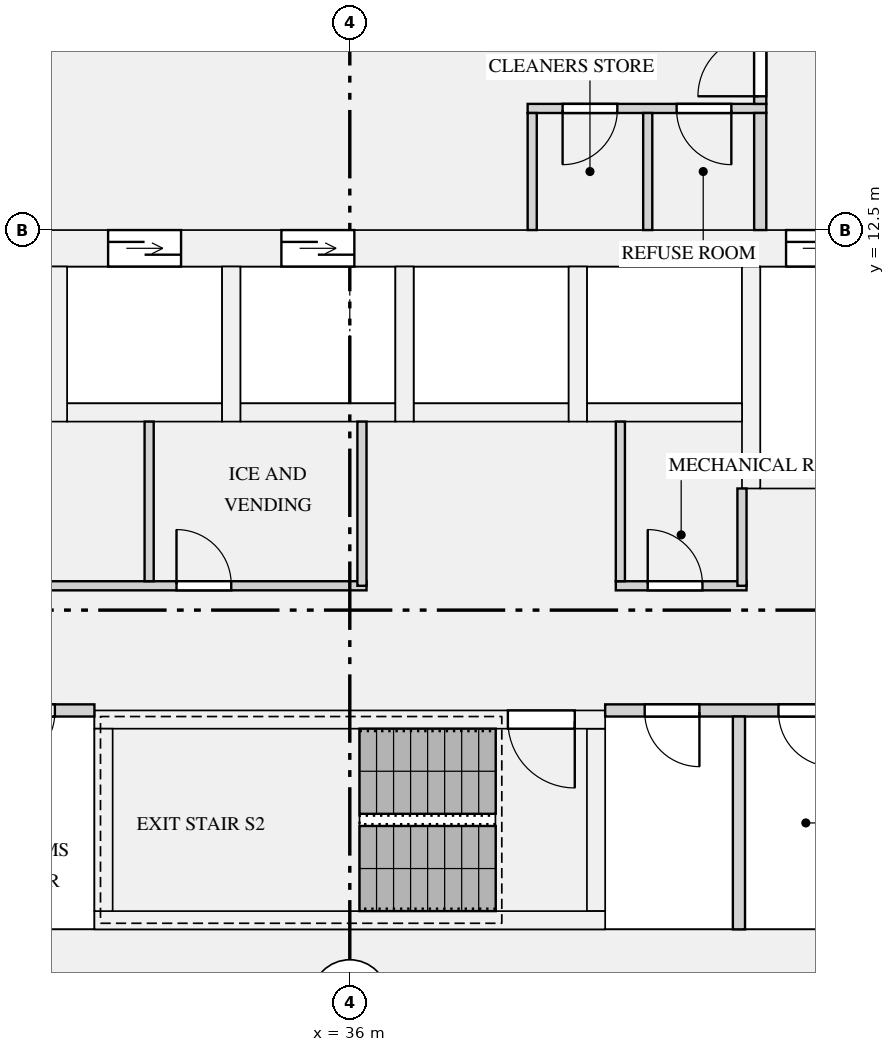
"""IFC4 building model, lengths in metres.
Left out: names, types, materials, properties, quantities, classifications, styles, units other than length and angle.
Written with IfcOpenShell. Run it as: python <this file> out.ifc"""

import sys

from ifc_helpers import new_model, si_unit, direction, frame, frame_2d, origin, place, context, subcontext, project, spatial, rectangle, extrude, element, fill, save


model = new_model("IFC4")
c1 = context("Model", 3, precision=1e-05, world=origin(), true_north=direction((0.0, 1.0)))
c2 = subcontext(c1, "Body", "Model", "MODEL_VIEW")
j1 = project(units=[si_unit("LENGTHUNIT", "METRE"), si_unit("PLANEANGLEUNIT", "RADIAN")], contexts=[c1])
p1 = place(None, origin())
s1 = spatial("IfcSite", under=j1, at=p1, CompositionType="ELEMENT")
p2 = place(p1, origin())
s2 = spatial("IfcBuilding", under=s1, at=p2, CompositionType="ELEMENT")
p3 = place(p2, frame((0.0, 0.0, 54.15)))
s3 = spatial("IfcBuildingStorey", under=s2, at=p3, CompositionType="ELEMENT", Elevation=54.15)
p4 = place(p3, frame((19.0, 0.5, 0.0), z_axis=(0.0, 0.0, 1.0), x_axis=(1.0, 0.0, 0.0)))
e1 = element("IfcWall", 1, at=p4, inside=s3, PredefinedType="SHEAR", context=c2, shape_type="SweptSolid", body=[
    extrude(rectangle(XDim=34.0, YDim=1.0, at=frame_2d((17.0, 0.0))), origin(), (0.0, 0.0, 1.0), 3.15),
])
p5 = place(p3, frame((19.0, 12.2, 0.0), z_axis=(0.0, 0.0, 1.0), x_axis=(1.0, 0.0, 0.0)))
e2 = element("IfcWall", 2, at=p5, inside=s3, PredefinedType="SHEAR", context=c2, shape_type="SweptSolid", body=[
    extrude(rectangle(XDim=34.0, YDim=0.6, at=frame_2d((17.0, 0.0))), origin(), (0.0, 0.0, 1.0), 3.15),
])
p6 = place(p5, frame((4.475, 0.0, 0.0)))
e3 = element("IfcOpeningElement", 3, at=p6, cuts=e2, PredefinedType="OPENING", context=c2, shape_type="SweptSolid", body=[
    extrude(rectangle(XDim=1.2, YDim=2.1, at=frame_2d((0.6, 1.05))), frame((0.0, 0.31, 0.0), z_axis=(0.0, -1.0, 0.0), x_axis=(1.0, 0.0, 0.0)), (0.0, 0.0, 1.0), 0.62),
])
p7 = place(p5, frame((7.325, 0.0, 0.0)))
e4 = element("IfcOpeningElement", 4, at=p7, cuts=e2, PredefinedType="OPENING", context=c2, shape_type="SweptSolid", body=[
    extrude(rectangle(XDim=1.2, YDim=2.1, at=frame_2d((0.6, 1.05))), frame((0.0, 0.31, 0.0), z_axis=(0.0, -1.0, 0.0), x_axis=(1.0, 0.0, 0.0)), (0.0, 0.0, 1.0), 0.62),
])
p8 = place(p5, frame((10.175, 0.0, 0.0)))
e5 = element("IfcOpeningElement", 5, at=p8, cuts=e2, PredefinedType="OPENING", context=c2, shape_type="SweptSolid", body=[
    extrude(rectangle(XDim=1.2, YDim=2.1, at=frame_2d((0.6, 1.05))), frame((0.0, 0.31, 0.0), z_axis=(0.0, -1.0, 0.0), x_axis=(1.0, 0.0, 0.0)), (0.0, 0.0, 1.0), 0.62),
])
p9 = place(p5, frame((13.025, 0.0, 0.0)))
e6 = element("IfcOpeningElement", 6, at=p9, cuts=e2, PredefinedType="OPENING", context=c2, shape_type="SweptSolid", body=[
    extrude(rectangle(XDim=1.2, YDim=2.1, at=frame_2d((0.6, 1.05))), frame((0.0, 0.31, 0.0), z_axis=(0.0, -1.0, 0.0), x_axis=(1.0, 0.0, 0.0)), (0.0, 0.0, 1.0), 0.62),
])
p10 = place(p5, frame((15.875, 0.0, 0.0)))
e7 = element("IfcOpeningElement", 7, at=p10, cuts=e2, PredefinedType="OPENING", context=c2, shape_type="SweptSolid", body=[
    extrude(rectangle(XDim=1.2, YDim=2.1, at=frame_2d((0.6, 1.05))), frame((0.0, 0.31, 0.0), z_axis=(0.0, -1.0, 0.0), x_axis=(1.0, 0.0, 0.0)), (0.0, 0.0, 1.0), 0.62),
])
p11 = place(p5, frame((24.175, 0.0, 0.0)))
e8 = element("IfcOpeningElement", 8, at=p11, cuts=e2, PredefinedType="OPENING", context=c2, shape_type="SweptSolid", body=[
    extrude(rectangle(XDim=1.1, YDim=2.1, at=frame_2d((0.55, 1.05))), frame((0.0, 0.31, 0.0), z_axis=(0.0, -1.0, 0.0), x_axis=(1.0, 0.0, 0.0)), (0.0, 0.0, 1.0), 0.62),
])
p12 = place(p5, frame((26.425, 0.0, 0.0)))
e9 = element("IfcOpeningElement", 9, at=p12, cuts=e2, PredefinedType="OPENING", context=c2, shape_type="SweptSolid", body=[
    extrude(rectangle(XDim=1.1, YDim=2.1, at=frame_2d((0.55, 1.05))), frame((0.0, 0.31, 0.0), z_axis=(0.0, -1.0, 0.0), x_axis=(1.0, 0.0, 0.0)), (0.0, 0.0, 1.0), 0.62),
])
p13 = place(p5, frame((28.675, 0.0, 0.0)))
e10 = element("IfcOpeningElement", 10, at=p13, cuts=e2, PredefinedType="OPENING", context=c2, shape_type="SweptSolid", body=[
    extrude(rectangle(XDim=1.1, YDim=2.1, at=frame_2d((0.55, 1.05))), frame((0.0, 0.31, 0.0), z_axis=(0.0, -1.0, 0.0), x_axis=(1.0, 0.0, 0.0)), (0.0, 0.0, 1.0), 0.62),
])
p14 = place(p5, frame((1.15, 0.0, 0.0)))
e11 = element("IfcOpeningElement", 11, at=p14, cuts=e2, PredefinedType="OPENING", context=c2, shape_type="SweptSolid", body=[
    extrude(rectangle(XDim=1.2, YDim=2.1, at=frame_2d((0.6, 1.05))), frame((0.0, 0.31, 0.0), z_axis=(0.0, -1.0, 0.0), x_axis=(1.0, 0.0, 0.0)), (0.0, 0.0, 1.0), 0.62),
])
p15 = place(p5, frame((31.65, 0.0, 0.0)))
e12 = element("IfcOpeningElement", 12, at=p15, cuts=e2, PredefinedType="OPENING", context=c2, shape_type="SweptSolid", body=[
    extrude(rectangle(XDim=1.2, YDim=2.1, at=frame_2d((0.6, 1.05))), frame((0.0, 0.31, 0.0), z_axis=(0.0, -1.0, 0.0), x_axis=(1.0, 0.0, 0.0)), (0.0, 0.0, 1.0), 0.62),
])
for number, where, z_axis, x_axis in (
    (13, (31.35, 9.5, 0.0), (0.0, 0.0, 1.0), (1.0, 0.0, 0.0)),
    (14, (31.2, 9.35, 0.0), (0.0, 0.0, 1.0), (0.0, 1.0, 0.0)),
):
    element("IfcWall", number, at=place(p3, frame(where, z_axis=z_axis, x_axis=x_axis)), inside=s3, PredefinedType="SHEAR", context=c2, shape_type="SweptSolid", body=[
        extrude(rectangle(XDim=2.55, YDim=0.3, at=frame_2d((1.275, 0.0))), origin(), (0.0, 0.0, 1.0), 3.15),
    ])
p16 = place(p3, frame((34.2, 9.5, 0.0), z_axis=(0.0, 0.0, 1.0), x_axis=(1.0, 0.0, 0.0)))
e15 = element("IfcWall", 15, at=p16, inside=s3, PredefinedType="SHEAR", context=c2, shape_type="SweptSolid", body=[
    extrude(rectangle(XDim=2.55, YDim=0.3, at=frame_2d((1.275, 0.0))), origin(), (0.0, 0.0, 1.0), 3.15),
])
p17 = place(p3, frame((34.05, 9.35, 0.0), z_axis=(0.0, 0.0, 1.0), x_axis=(0.0, 1.0, 0.0)))
e16 = element("IfcWall", 16, at=p17, inside=s3, PredefinedType="SHEAR", context=c2, shape_type="SweptSolid", body=[
    extrude(rectangle(XDim=2.55, YDim=0.3, at=frame_2d((1.275, 0.0))), origin(), (0.0, 0.0, 1.0), 3.15),
])
p18 = place(p3, frame((37.05, 9.5, 0.0), z_axis=(0.0, 0.0, 1.0), x_axis=(1.0, 0.0, 0.0)))
e17 = element("IfcWall", 17, at=p18, inside=s3, PredefinedType="SHEAR", context=c2, shape_type="SweptSolid", body=[
    extrude(rectangle(XDim=2.55, YDim=0.3, at=frame_2d((1.275, 0.0))), origin(), (0.0, 0.0, 1.0), 3.15),
])
p19 = place(p3, frame((36.9, 9.35, 0.0), z_axis=(0.0, 0.0, 1.0), x_axis=(0.0, 1.0, 0.0)))
e18 = element("IfcWall", 18, at=p19, inside=s3, PredefinedType="SHEAR", context=c2, shape_type="SweptSolid", body=[
    extrude(rectangle(XDim=2.55, YDim=0.3, at=frame_2d((1.275, 0.0))), origin(), (0.0, 0.0, 1.0), 3.15),
])
p20 = place(p3, frame((39.9, 9.5, 0.0), z_axis=(0.0, 0.0, 1.0), x_axis=(1.0, 0.0, 0.0)))
e19 = element("IfcWall", 19, at=p20, inside=s3, PredefinedType="SHEAR", context=c2, shape_type="SweptSolid", body=[
    extrude(rectangle(XDim=2.55, YDim=0.3, at=frame_2d((1.275, 0.0))), origin(), (0.0, 0.0, 1.0), 3.15),
])
p21 = place(p3, frame((39.75, 9.35, 0.0), z_axis=(0.0, 0.0, 1.0), x_axis=(0.0, 1.0, 0.0)))
e20 = element("IfcWall", 20, at=p21, inside=s3, PredefinedType="SHEAR", context=c2, shape_type="SweptSolid", body=[
    extrude(rectangle(XDim=2.55, YDim=0.3, at=frame_2d((1.275, 0.0))), origin(), (0.0, 0.0, 1.0), 3.15),
])
p22 = place(p3, frame((42.75, 8.4, 0.0), z_axis=(0.0, 0.0, 1.0), x_axis=(1.0, 0.0, 0.0)))
e21 = element("IfcWall", 21, at=p22, inside=s3, PredefinedType="SHEAR", context=c2, shape_type="SweptSolid", body=[
    extrude(rectangle(XDim=1.95, YDim=0.3, at=frame_2d((0.975, 0.0))), origin(), (0.0, 0.0, 1.0), 3.15),
])
p23 = place(p3, frame((42.6, 8.25, 0.0), z_axis=(0.0, 0.0, 1.0), x_axis=(0.0, 1.0, 0.0)))
e22 = element("IfcWall", 22, at=p23, inside=s3, PredefinedType="SHEAR", context=c2, shape_type="SweptSolid", body=[
    extrude(rectangle(XDim=3.65, YDim=0.3, at=frame_2d((1.825, 0.0))), origin(), (0.0, 0.0, 1.0), 3.15),
])
p24 = place(p3, frame((31.8, 1.15, 0.0), z_axis=(0.0, 0.0, 1.0), x_axis=(1.0, 0.0, 0.0)))
e23 = element("IfcWall", 23, at=p24, inside=s3, PredefinedType="SHEAR", context=c2, shape_type="SweptSolid", body=[
    extrude(rectangle(XDim=8.4, YDim=0.3, at=frame_2d((4.2, 0.0))), origin(), (0.0, 0.0, 1.0), 3.15),
])
p25 = place(p3, frame((31.8, 4.45, 0.0), z_axis=(0.0, 0.0, 1.0), x_axis=(1.0, 0.0, 0.0)))
e24 = element("IfcWall", 24, at=p25, inside=s3, PredefinedType="SHEAR", context=c2, shape_type="SweptSolid", body=[
    extrude(rectangle(XDim=8.4, YDim=0.3, at=frame_2d((4.2, 0.0))), origin(), (0.0, 0.0, 1.0), 3.15),
])
p26 = place(p25, frame((6.8, 0.0, 0.0)))
e25 = element("IfcOpeningElement", 25, at=p26, cuts=e24, PredefinedType="OPENING", context=c2, shape_type="SweptSolid", body=[
    extrude(rectangle(XDim=1.1, YDim=2.1, at=frame_2d((0.55, 1.05))), frame((0.0, 0.16, 0.0), z_axis=(0.0, -1.0, 0.0), x_axis=(1.0, 0.0, 0.0)), (0.0, 0.0, 1.0), 0.32),
])
for number, where, z_axis, x_axis in (
    (26, (31.95, 1.3, 0.0), (0.0, 0.0, 1.0), (0.0, 1.0, 0.0)),
    (27, (40.05, 1.3, 0.0), (0.0, 0.0, 1.0), (0.0, 1.0, 0.0)),
):
    element("IfcWall", number, at=place(p3, frame(where, z_axis=z_axis, x_axis=x_axis)), inside=s3, PredefinedType="SHEAR", context=c2, shape_type="SweptSolid", body=[
        extrude(rectangle(XDim=3.0, YDim=0.3, at=frame_2d((1.5, 0.0))), origin(), (0.0, 0.0, 1.0), 3.15),
    ])
p27 = place(p3, frame((27.3, 4.6, 0.0), z_axis=(0.0, 0.0, 1.0), x_axis=(1.0, 0.0, 0.0)))
e28 = element("IfcWall", 28, at=p27, inside=s3, PredefinedType="PARTITIONING", context=c2, shape_type="SweptSolid", body=[
    extrude(rectangle(XDim=4.5, YDim=0.2, at=frame_2d((2.25, 0.0))), origin(), (0.0, 0.0, 1.0), 2.83),
])
p28 = place(p27, frame((0.75, 0.0, 0.0)))
e29 = element("IfcOpeningElement", 29, at=p28, cuts=e28, PredefinedType="OPENING", context=c2, shape_type="SweptSolid", body=[
    extrude(rectangle(XDim=0.9, YDim=2.1, at=frame_2d((0.45, 1.05))), frame((0.0, 0.11, 0.0), z_axis=(0.0, -1.0, 0.0), x_axis=(1.0, 0.0, 0.0)), (0.0, 0.0, 1.0), 0.22),
])
p29 = place(p27, frame((2.95, 0.0, 0.0)))
e30 = element("IfcOpeningElement", 30, at=p29, cuts=e28, PredefinedType="OPENING", context=c2, shape_type="SweptSolid", body=[
    extrude(rectangle(XDim=0.9, YDim=2.1, at=frame_2d((0.45, 1.05))), frame((0.0, 0.11, 0.0), z_axis=(0.0, -1.0, 0.0), x_axis=(1.0, 0.0, 0.0)), (0.0, 0.0, 1.0), 0.22),
])
p30 = place(p3, frame((40.2, 4.6, 0.0), z_axis=(0.0, 0.0, 1.0), x_axis=(1.0, 0.0, 0.0)))
e31 = element("IfcWall", 31, at=p30, inside=s3, PredefinedType="PARTITIONING", context=c2, shape_type="SweptSolid", body=[
    extrude(rectangle(XDim=4.5, YDim=0.2, at=frame_2d((2.25, 0.0))), origin(), (0.0, 0.0, 1.0), 2.83),
])
p31 = place(p30, frame((0.65, 0.0, 0.0)))
e32 = element("IfcOpeningElement", 32, at=p31, cuts=e31, PredefinedType="OPENING", context=c2, shape_type="SweptSolid", body=[
    extrude(rectangle(XDim=0.9, YDim=2.1, at=frame_2d((0.45, 1.05))), frame((0.0, 0.11, 0.0), z_axis=(0.0, -1.0, 0.0), x_axis=(1.0, 0.0, 0.0)), (0.0, 0.0, 1.0), 0.22),
])
p32 = place(p30, frame((2.85, 0.0, 0.0)))
e33 = element("IfcOpeningElement", 33, at=p32, cuts=e31, PredefinedType="OPENING", context=c2, shape_type="SweptSolid", body=[
    extrude(rectangle(XDim=0.9, YDim=2.1, at=frame_2d((0.45, 1.05))), frame((0.0, 0.11, 0.0), z_axis=(0.0, -1.0, 0.0), x_axis=(1.0, 0.0, 0.0)), (0.0, 0.0, 1.0), 0.22),
])
p33 = place(p3, frame((27.625, 6.65, 0.0), z_axis=(0.0, 0.0, 1.0), x_axis=(1.0, 0.0, 0.0)))
e34 = element("IfcWall", 34, at=p33, inside=s3, PredefinedType="PARTITIONING", context=c2, shape_type="SweptSolid", body=[
    extrude(rectangle(XDim=8.65, YDim=0.15, at=frame_2d((4.325, 0.0))), origin(), (0.0, 0.0, 1.0), 2.83),
])
p34 = place(p33, frame((0.525, 0.0, 0.0)))
e35 = element("IfcOpeningElement", 35, at=p34, cuts=e34, PredefinedType="OPENING", context=c2, shape_type="SweptSolid", body=[
    extrude(rectangle(XDim=0.9, YDim=2.1, at=frame_2d((0.45, 1.05))), frame((0.0, 0.085, 0.0), z_axis=(0.0, -1.0, 0.0), x_axis=(1.0, 0.0, 0.0)), (0.0, 0.0, 1.0), 0.17),
])
p35 = place(p33, frame((5.525, 0.0, 0.0)))
e36 = element("IfcOpeningElement", 36, at=p35, cuts=e34, PredefinedType="OPENING", context=c2, shape_type="SweptSolid", body=[
    extrude(rectangle(XDim=0.9, YDim=2.1, at=frame_2d((0.45, 1.05))), frame((0.0, 0.085, 0.0), z_axis=(0.0, -1.0, 0.0), x_axis=(1.0, 0.0, 0.0)), (0.0, 0.0, 1.0), 0.17),
])
p36 = place(p3, frame((40.375, 6.65, 0.0), z_axis=(0.0, 0.0, 1.0), x_axis=(1.0, 0.0, 0.0)))
e37 = element("IfcWall", 37, at=p36, inside=s3, PredefinedType="PARTITIONING", context=c2, shape_type="SweptSolid", body=[
    extrude(rectangle(XDim=2.15, YDim=0.15, at=frame_2d((1.075, 0.0))), origin(), (0.0, 0.0, 1.0), 2.83),
])
p37 = place(p36, frame((0.525, 0.0, 0.0)))
e38 = element("IfcOpeningElement", 38, at=p37, cuts=e37, PredefinedType="OPENING", context=c2, shape_type="SweptSolid", body=[
    extrude(rectangle(XDim=0.9, YDim=2.1, at=frame_2d((0.45, 1.05))), frame((0.0, 0.085, 0.0), z_axis=(0.0, -1.0, 0.0), x_axis=(1.0, 0.0, 0.0)), (0.0, 0.0, 1.0), 0.17),
])
p38 = place(p3, frame((38.925, 14.5, 0.0), z_axis=(0.0, 0.0, 1.0), x_axis=(1.0, 0.0, 0.0)))
e39 = element("IfcWall", 39, at=p38, inside=s3, PredefinedType="PARTITIONING", context=c2, shape_type="SweptSolid", body=[
    extrude(rectangle(XDim=3.925, YDim=0.15, at=frame_2d((1.962, 0.0))), origin(), (0.0, 0.0, 1.0), 2.83),
])
p39 = place(p38, frame((0.575, 0.0, 0.0)))
e40 = element("IfcOpeningElement", 40, at=p39, cuts=e39, PredefinedType="OPENING", context=c2, shape_type="SweptSolid", body=[
    extrude(rectangle(XDim=0.9, YDim=2.1, at=frame_2d((0.45, 1.05))), frame((0.0, 0.085, 0.0), z_axis=(0.0, -1.0, 0.0), x_axis=(1.0, 0.0, 0.0)), (0.0, 0.0, 1.0), 0.17),
])
p40 = place(p38, frame((2.45, 0.0, 0.0)))
e41 = element("IfcOpeningElement", 41, at=p40, cuts=e39, PredefinedType="OPENING", context=c2, shape_type="SweptSolid", body=[
    extrude(rectangle(XDim=0.9, YDim=2.1, at=frame_2d((0.45, 1.05))), frame((0.0, 0.085, 0.0), z_axis=(0.0, -1.0, 0.0), x_axis=(1.0, 0.0, 0.0)), (0.0, 0.0, 1.0), 0.17),
])
p41 = place(p3, frame((42.4, 1.0, 0.0), z_axis=(0.0, 0.0, 1.0), x_axis=(0.0, 1.0, 0.0)))
e42 = element("IfcWall", 42, at=p41, inside=s3, PredefinedType="PARTITIONING", context=c2, shape_type="SweptSolid", body=[
    extrude(rectangle(XDim=3.5, YDim=0.2, at=frame_2d((1.75, 0.0))), origin(), (0.0, 0.0, 1.0), 2.83),
])
p42 = place(p3, frame((36.2, 6.65, 0.0), z_axis=(0.0, 0.0, 1.0), x_axis=(0.0, 1.0, 0.0)))
e43 = element("IfcWall", 43, at=p42, inside=s3, PredefinedType="PARTITIONING", context=c2, shape_type="SweptSolid", body=[
    extrude(rectangle(XDim=2.7, YDim=0.15, at=frame_2d((1.35, 0.0))), origin(), (0.0, 0.0, 1.0), 2.83),
])
p43 = place(p3, frame((42.45, 6.65, 0.0), z_axis=(0.0, 0.0, 1.0), x_axis=(0.0, 1.0, 0.0)))
e44 = element("IfcWall", 44, at=p43, inside=s3, PredefinedType="PARTITIONING", context=c2, shape_type="SweptSolid", body=[
    extrude(rectangle(XDim=1.6, YDim=0.15, at=frame_2d((0.8, 0.0))), origin(), (0.0, 0.0, 1.0), 2.83),
])
for number, where, z_axis, x_axis in (
    (45, (32.7, 6.725, 0.0), (0.0, 0.0, 1.0), (0.0, 1.0, 0.0)),
    (46, (40.45, 6.725, 0.0), (0.0, 0.0, 1.0), (0.0, 1.0, 0.0)),
):
    element("IfcWall", number, at=place(p3, frame(where, z_axis=z_axis, x_axis=x_axis)), inside=s3, PredefinedType="PARTITIONING", context=c2, shape_type="SweptSolid", body=[
        extrude(rectangle(XDim=2.625, YDim=0.15, at=frame_2d((1.312, 0.0))), origin(), (0.0, 0.0, 1.0), 2.83),
    ])
for number, where, z_axis, x_axis in (
    (47, (39.0, 12.5, 0.0), (0.0, 0.0, 1.0), (0.0, 1.0, 0.0)),
    (48, (40.9, 12.5, 0.0), (0.0, 0.0, 1.0), (0.0, 1.0, 0.0)),
):
    element("IfcWall", number, at=place(p3, frame(where, z_axis=z_axis, x_axis=x_axis)), inside=s3, PredefinedType="PARTITIONING", context=c2, shape_type="SweptSolid", body=[
        extrude(rectangle(XDim=1.925, YDim=0.15, at=frame_2d((0.962, 0.0))), origin(), (0.0, 0.0, 1.0), 2.83),
    ])
p44 = place(p3, frame((42.75, 12.5, 0.0), z_axis=(0.0, 0.0, 1.0), x_axis=(0.0, 1.0, 0.0)))
e49 = element("IfcWall", 49, at=p44, inside=s3, PredefinedType="PARTITIONING", context=c2, shape_type="SweptSolid", body=[
    extrude(rectangle(XDim=1.925, YDim=0.2, at=frame_2d((0.962, 0.0))), origin(), (0.0, 0.0, 1.0), 2.83),
])
p45 = place(p3, frame((42.75, 14.575, 0.0), z_axis=(0.0, 0.0, 1.0), x_axis=(0.0, 1.0, 0.0)))
e50 = element("IfcWall", 50, at=p45, inside=s3, PredefinedType="PARTITIONING", context=c2, shape_type="SweptSolid", body=[
    extrude(rectangle(XDim=1.325, YDim=0.2, at=frame_2d((0.663, 0.0))), origin(), (0.0, 0.0, 1.0), 2.83),
])
p46 = place(p45, frame((0.125, 0.0, 0.0)))
e51 = element("IfcOpeningElement", 51, at=p46, cuts=e50, PredefinedType="OPENING", context=c2, shape_type="SweptSolid", body=[
    extrude(rectangle(XDim=1.0, YDim=2.1, at=frame_2d((0.5, 1.05))), frame((0.0, 0.11, 0.0), z_axis=(0.0, -1.0, 0.0), x_axis=(1.0, 0.0, 0.0)), (0.0, 0.0, 1.0), 0.22),
])
p47 = place(p9, origin())
e52 = element("IfcDoor", 52, at=p47, inside=s3, OperationType="DOUBLE_DOOR_SLIDING", PredefinedType="DOOR", context=c2, shape_type="SweptSolid", body=[
    extrude(rectangle(XDim=1.2, YDim=2.1, at=frame_2d((0.6, 1.05))), frame((0.0, 0.025, 0.0), z_axis=(0.0, -1.0, 0.0), x_axis=(1.0, 0.0, 0.0)), (0.0, 0.0, 1.0), 0.05),
])
fill(e6, e52)
p48 = place(p10, origin())
e53 = element("IfcDoor", 53, at=p48, inside=s3, OperationType="DOUBLE_DOOR_SLIDING", PredefinedType="DOOR", context=c2, shape_type="SweptSolid", body=[
    extrude(rectangle(XDim=1.2, YDim=2.1, at=frame_2d((0.6, 1.05))), frame((0.0, 0.025, 0.0), z_axis=(0.0, -1.0, 0.0), x_axis=(1.0, 0.0, 0.0)), (0.0, 0.0, 1.0), 0.05),
])
fill(e7, e53)
p49 = place(p11, origin())
e54 = element("IfcDoor", 54, at=p49, inside=s3, OperationType="DOUBLE_DOOR_SLIDING", PredefinedType="DOOR", context=c2, shape_type="SweptSolid", body=[
    extrude(rectangle(XDim=1.1, YDim=2.1, at=frame_2d((0.55, 1.05))), frame((0.0, 0.025, 0.0), z_axis=(0.0, -1.0, 0.0), x_axis=(1.0, 0.0, 0.0)), (0.0, 0.0, 1.0), 0.05),
])
fill(e8, e54)
p50 = place(p26, frame((1.1, 0.0, 0.0), z_axis=(0.0, 0.0, 1.0), x_axis=(-1.0, 0.0, 0.0)))
e55 = element("IfcDoor", 55, at=p50, inside=s3, OperationType="SINGLE_SWING_LEFT", PredefinedType="DOOR", context=c2, shape_type="SweptSolid", body=[
    extrude(rectangle(XDim=1.1, YDim=2.1, at=frame_2d((0.55, 1.05))), frame((0.0, 0.025, 0.0), z_axis=(0.0, -1.0, 0.0), x_axis=(1.0, 0.0, 0.0)), (0.0, 0.0, 1.0), 0.05),
])
fill(e25, e55)
p51 = place(p35, origin())
e56 = element("IfcDoor", 56, at=p51, inside=s3, OperationType="SINGLE_SWING_LEFT", PredefinedType="DOOR", context=c2, shape_type="SweptSolid", body=[
    extrude(rectangle(XDim=0.9, YDim=2.1, at=frame_2d((0.45, 1.05))), frame((0.0, 0.025, 0.0), z_axis=(0.0, -1.0, 0.0), x_axis=(1.0, 0.0, 0.0)), (0.0, 0.0, 1.0), 0.05),
])
fill(e36, e56)
p52 = place(p37, origin())
e57 = element("IfcDoor", 57, at=p52, inside=s3, OperationType="SINGLE_SWING_LEFT", PredefinedType="DOOR", context=c2, shape_type="SweptSolid", body=[
    extrude(rectangle(XDim=0.9, YDim=2.1, at=frame_2d((0.45, 1.05))), frame((0.0, 0.025, 0.0), z_axis=(0.0, -1.0, 0.0), x_axis=(1.0, 0.0, 0.0)), (0.0, 0.0, 1.0), 0.05),
])
fill(e38, e57)
p53 = place(p39, frame((0.9, 0.0, 0.0), z_axis=(0.0, 0.0, 1.0), x_axis=(-1.0, 0.0, 0.0)))
e58 = element("IfcDoor", 58, at=p53, inside=s3, OperationType="SINGLE_SWING_RIGHT", PredefinedType="DOOR", context=c2, shape_type="SweptSolid", body=[
    extrude(rectangle(XDim=0.9, YDim=2.1, at=frame_2d((0.45, 1.05))), frame((0.0, 0.025, 0.0), z_axis=(0.0, -1.0, 0.0), x_axis=(1.0, 0.0, 0.0)), (0.0, 0.0, 1.0), 0.05),
])
fill(e40, e58)
p54 = place(p40, frame((0.9, 0.0, 0.0), z_axis=(0.0, 0.0, 1.0), x_axis=(-1.0, 0.0, 0.0)))
e59 = element("IfcDoor", 59, at=p54, inside=s3, OperationType="SINGLE_SWING_LEFT", PredefinedType="DOOR", context=c2, shape_type="SweptSolid", body=[
    extrude(rectangle(XDim=0.9, YDim=2.1, at=frame_2d((0.45, 1.05))), frame((0.0, 0.025, 0.0), z_axis=(0.0, -1.0, 0.0), x_axis=(1.0, 0.0, 0.0)), (0.0, 0.0, 1.0), 0.05),
])
fill(e41, e59)
p55 = place(p29, frame((0.9, 0.0, 0.0), z_axis=(0.0, 0.0, 1.0), x_axis=(-1.0, 0.0, 0.0)))
e60 = element("IfcDoor", 60, at=p55, inside=s3, OperationType="SINGLE_SWING_RIGHT", PredefinedType="DOOR", context=c2, shape_type="SweptSolid", body=[
    extrude(rectangle(XDim=0.9, YDim=2.1, at=frame_2d((0.45, 1.05))), frame((0.0, 0.025, 0.0), z_axis=(0.0, -1.0, 0.0), x_axis=(1.0, 0.0, 0.0)), (0.0, 0.0, 1.0), 0.05),
])
fill(e30, e60)
p56 = place(p31, frame((0.9, 0.0, 0.0), z_axis=(0.0, 0.0, 1.0), x_axis=(-1.0, 0.0, 0.0)))
e61 = element("IfcDoor", 61, at=p56, inside=s3, OperationType="SINGLE_SWING_LEFT", PredefinedType="DOOR", context=c2, shape_type="SweptSolid", body=[
    extrude(rectangle(XDim=0.9, YDim=2.1, at=frame_2d((0.45, 1.05))), frame((0.0, 0.025, 0.0), z_axis=(0.0, -1.0, 0.0), x_axis=(1.0, 0.0, 0.0)), (0.0, 0.0, 1.0), 0.05),
])
fill(e32, e61)
p57 = place(p32, frame((0.9, 0.0, 0.0), z_axis=(0.0, 0.0, 1.0), x_axis=(-1.0, 0.0, 0.0)))
e62 = element("IfcDoor", 62, at=p57, inside=s3, OperationType="SINGLE_SWING_LEFT", PredefinedType="DOOR", context=c2, shape_type="SweptSolid", body=[
    extrude(rectangle(XDim=0.9, YDim=2.1, at=frame_2d((0.45, 1.05))), frame((0.0, 0.025, 0.0), z_axis=(0.0, -1.0, 0.0), x_axis=(1.0, 0.0, 0.0)), (0.0, 0.0, 1.0), 0.05),
])
fill(e33, e62)
p58 = place(p46, origin())
e63 = element("IfcDoor", 63, at=p58, inside=s3, OperationType="SINGLE_SWING_LEFT", PredefinedType="DOOR", context=c2, shape_type="SweptSolid", body=[
    extrude(rectangle(XDim=1.0, YDim=2.1, at=frame_2d((0.5, 1.05))), frame((0.0, 0.025, 0.0), z_axis=(0.0, -1.0, 0.0), x_axis=(1.0, 0.0, 0.0)), (0.0, 0.0, 1.0), 0.05),
])
fill(e51, e63)
save(model, sys.argv[1])
